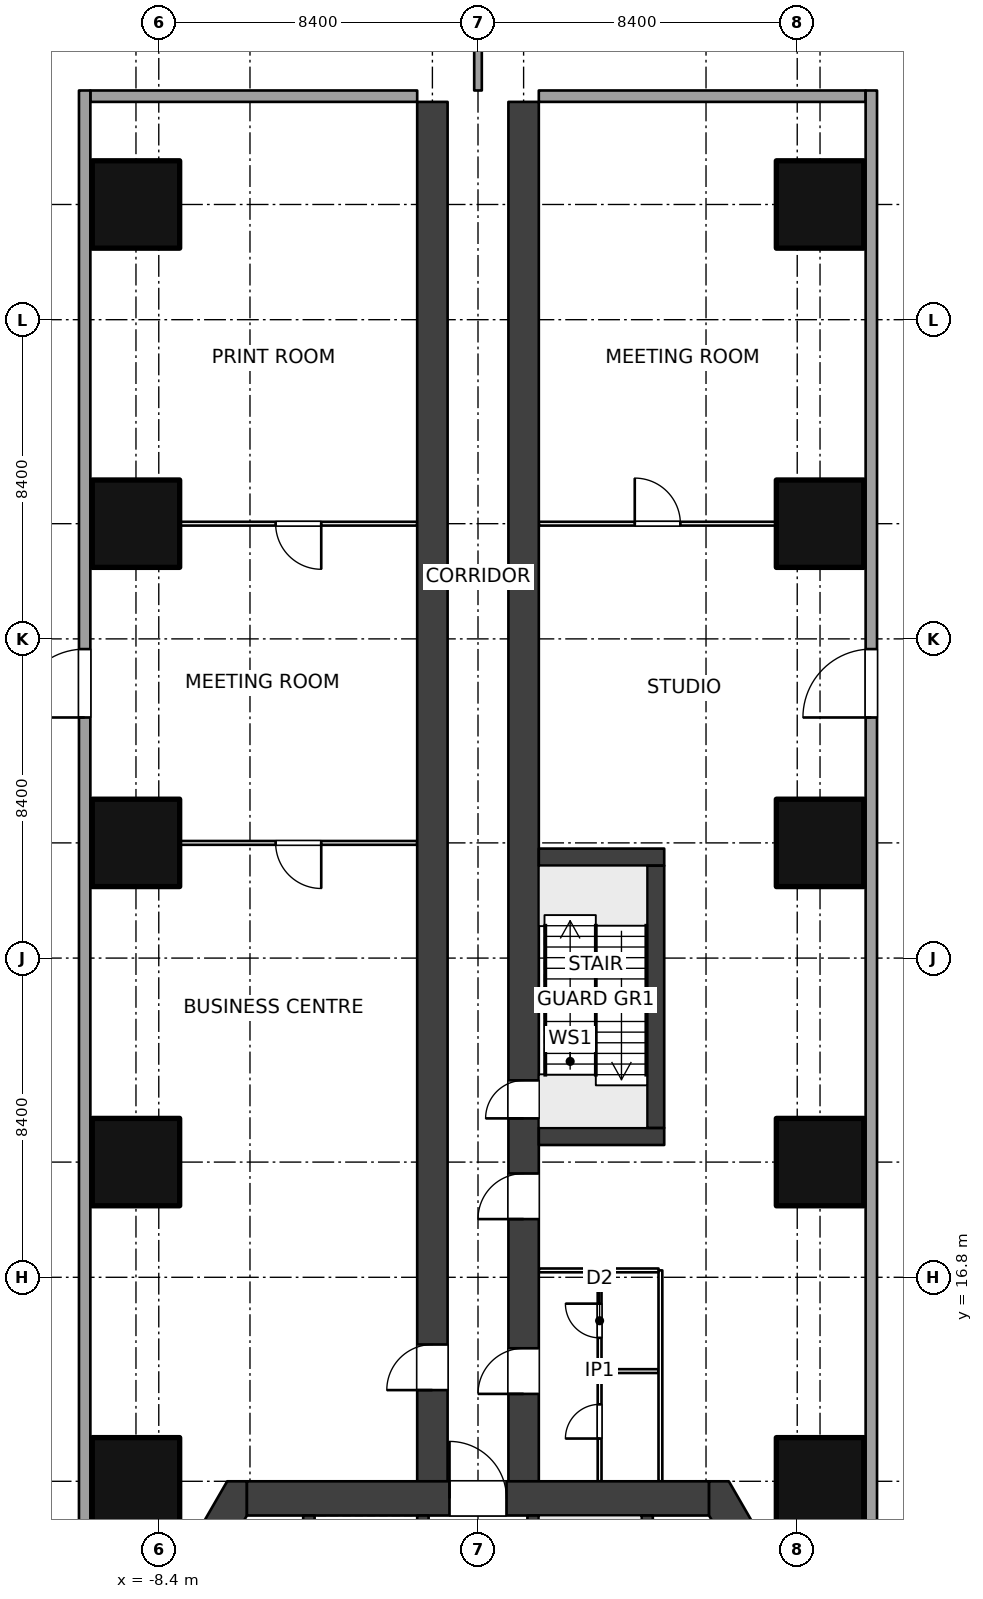
"""IFC4 building model, lengths in metres.
Left out: names, types, materials, properties, quantities, classifications, styles, units other than length and angle.
Written with IfcOpenShell. Run it as: python <this file> out.ifc"""

import sys

from ifc_helpers import new_model, si_unit, direction, frame, frame_2d, origin, origin_2d, place, context, subcontext, project, spatial, polyline, rectangle, outline, extrude, element, fill, save


model = new_model("IFC4")
c1 = context("Model", 3, precision=1e-05, world=origin(), true_north=direction((0.0, 1.0)))
c2 = subcontext(c1, "Body", "Model", "MODEL_VIEW")
j1 = project(units=[si_unit("LENGTHUNIT", "METRE"), si_unit("PLANEANGLEUNIT", "RADIAN")], contexts=[c1])
p1 = place(None, origin())
s1 = spatial("IfcSite", under=j1, at=p1, CompositionType="ELEMENT")
p2 = place(p1, origin())
s2 = spatial("IfcBuilding", under=s1, at=p2, CompositionType="ELEMENT")
p3 = place(p2, frame((0.0, 0.0, 6.0)))
s3 = spatial("IfcBuildingStorey", under=s2, at=p3, CompositionType="ELEMENT", Elevation=6.0)
for number, where, z_axis, x_axis in (
    (1, (-9.0, 11.432, 0.0), (0.0, 0.0, 1.0), (1.0, 0.0, 0.0)),
    (2, (9.0, 11.432, 0.0), (0.0, 0.0, 1.0), (1.0, 0.0, 0.0)),
    (3, (-9.0, 19.832, 0.0), (0.0, 0.0, 1.0), (1.0, 0.0, 0.0)),
    (4, (9.0, 19.832, 0.0), (0.0, 0.0, 1.0), (1.0, 0.0, 0.0)),
    (5, (-9.0, 28.231, 0.0), (0.0, 0.0, 1.0), (1.0, 0.0, 0.0)),
    (6, (9.0, 28.231, 0.0), (0.0, 0.0, 1.0), (1.0, 0.0, 0.0)),
    (7, (-9.0, 36.632, 0.0), (0.0, 0.0, 1.0), (1.0, 0.0, 0.0)),
    (8, (9.0, 36.632, 0.0), (0.0, 0.0, 1.0), (1.0, 0.0, 0.0)),
    (9, (-9.0, 45.031, 0.0), (0.0, 0.0, 1.0), (1.0, 0.0, 0.0)),
    (10, (9.0, 45.031, 0.0), (0.0, 0.0, 1.0), (1.0, 0.0, 0.0)),
):
    element("IfcColumn", number, at=place(p3, frame(where, z_axis=z_axis, x_axis=x_axis)), inside=s3, PredefinedType="COLUMN", context=c2, shape_type="SweptSolid", body=[
        extrude(rectangle(XDim=2.3, YDim=2.3, at=origin_2d()), origin(), (0.0, 0.0, 1.0), 5.0),
    ])
p4 = place(p3, frame((-6.08, 10.981, 0.0), z_axis=(0.0, 0.0, 1.0), x_axis=(1.0, 0.0, 0.0)))
e11 = element("IfcWall", 11, at=p4, inside=s3, PredefinedType="SHEAR", context=c2, shape_type="SweptSolid", body=[
    extrude(rectangle(XDim=12.161, YDim=0.9, at=frame_2d((6.08, 0.0))), origin(), (0.0, 0.0, 1.0), 5.0),
])
p5 = place(p4, frame((5.33, 0.0, 0.0)))
e12 = element("IfcOpeningElement", 12, at=p5, cuts=e11, PredefinedType="OPENING", context=c2, shape_type="SweptSolid", body=[
    extrude(rectangle(XDim=1.5, YDim=2.1, at=frame_2d((0.75, 1.05))), frame((0.0, 0.46, 0.0), z_axis=(0.0, -1.0, 0.0), x_axis=(1.0, 0.0, 0.0)), (0.0, 0.0, 1.0), 0.92),
])
p6 = place(p3, origin())
e13 = element("IfcWall", 13, at=p6, inside=s3, PredefinedType="SHEAR", context=c2, shape_type="SweptSolid", body=[
    extrude(outline(polyline([(13.2, 0.0), (6.6, 11.432), (6.08, 11.432), (6.08, 10.531), (12.161, 0.0), (12.94, -0.45), (13.2, 0.0)])), origin(), (0.0, 0.0, 1.0), 5.0),
])
p7 = place(p3, origin())
e14 = element("IfcWall", 14, at=p7, inside=s3, PredefinedType="SHEAR", context=c2, shape_type="SweptSolid", body=[
    extrude(outline(polyline([(-6.6, 11.432), (-13.2, 0.0), (-12.94, -0.45), (-12.161, 0.0), (-6.08, 10.531), (-6.08, 11.432), (-6.6, 11.432)])), origin(), (0.0, 0.0, 1.0), 5.0),
])
p8 = place(p3, frame((1.45, 3.63, 0.0), z_axis=(0.0, 0.0, 1.0), x_axis=(0.0, 1.0, 0.0)))
e15 = element("IfcWall", 15, at=p8, inside=s3, PredefinedType="SHEAR", context=c2, shape_type="SweptSolid", body=[
    extrude(rectangle(XDim=6.902, YDim=0.3, at=frame_2d((3.451, 0.0))), origin(), (0.0, 0.0, 1.0), 5.0),
])
p9 = place(p8, frame((0.25, 0.0, 0.0)))
e16 = element("IfcOpeningElement", 16, at=p9, cuts=e15, PredefinedType="OPENING", context=c2, shape_type="SweptSolid", body=[
    extrude(rectangle(XDim=1.0, YDim=2.1, at=frame_2d((0.5, 1.05))), frame((0.0, 0.16, 0.0), z_axis=(0.0, -1.0, 0.0), x_axis=(1.0, 0.0, 0.0)), (0.0, 0.0, 1.0), 0.32),
])
p10 = place(p3, frame((4.45, 3.63, 0.0), z_axis=(0.0, 0.0, 1.0), x_axis=(0.0, 1.0, 0.0)))
e17 = element("IfcWall", 17, at=p10, inside=s3, PredefinedType="SHEAR", context=c2, shape_type="SweptSolid", body=[
    extrude(rectangle(XDim=6.902, YDim=0.3, at=frame_2d((3.451, 0.0))), origin(), (0.0, 0.0, 1.0), 5.0),
])
p11 = place(p3, frame((-1.45, 3.63, 0.0), z_axis=(0.0, 0.0, 1.0), x_axis=(0.0, 1.0, 0.0)))
e18 = element("IfcWall", 18, at=p11, inside=s3, PredefinedType="SHEAR", context=c2, shape_type="SweptSolid", body=[
    extrude(rectangle(XDim=6.902, YDim=0.3, at=frame_2d((3.451, 0.0))), origin(), (0.0, 0.0, 1.0), 5.0),
])
p12 = place(p11, frame((4.85, 0.0, 0.0)))
e19 = element("IfcOpeningElement", 19, at=p12, cuts=e18, PredefinedType="OPENING", context=c2, shape_type="SweptSolid", body=[
    extrude(rectangle(XDim=1.1, YDim=2.1, at=frame_2d((0.55, 1.05))), frame((0.0, 0.16, 0.0), z_axis=(0.0, -1.0, 0.0), x_axis=(1.0, 0.0, 0.0)), (0.0, 0.0, 1.0), 0.32),
])
p13 = place(p3, frame((-4.45, 3.63, 0.0), z_axis=(0.0, 0.0, 1.0), x_axis=(0.0, 1.0, 0.0)))
e20 = element("IfcWall", 20, at=p13, inside=s3, PredefinedType="SHEAR", context=c2, shape_type="SweptSolid", body=[
    extrude(rectangle(XDim=6.902, YDim=0.3, at=frame_2d((3.451, 0.0))), origin(), (0.0, 0.0, 1.0), 5.0),
])
p14 = place(p3, frame((-1.2, 10.981, 0.0), z_axis=(0.0, 0.0, 1.0), x_axis=(0.0, 1.0, 0.0)))
e21 = element("IfcWall", 21, at=p14, inside=s3, PredefinedType="SHEAR", context=c2, shape_type="SweptSolid", body=[
    extrude(rectangle(XDim=36.75, YDim=0.8, at=frame_2d((18.375, 0.0))), origin(), (0.0, 0.0, 1.0), 5.0),
])
p15 = place(p14, frame((2.85, 0.0, 0.0)))
e22 = element("IfcOpeningElement", 22, at=p15, cuts=e21, PredefinedType="OPENING", context=c2, shape_type="SweptSolid", body=[
    extrude(rectangle(XDim=1.2, YDim=2.1, at=frame_2d((0.6, 1.05))), frame((0.0, 0.41, 0.0), z_axis=(0.0, -1.0, 0.0), x_axis=(1.0, 0.0, 0.0)), (0.0, 0.0, 1.0), 0.82),
])
p16 = place(p3, frame((1.2, 10.981, 0.0), z_axis=(0.0, 0.0, 1.0), x_axis=(0.0, 1.0, 0.0)))
e23 = element("IfcWall", 23, at=p16, inside=s3, PredefinedType="SHEAR", context=c2, shape_type="SweptSolid", body=[
    extrude(rectangle(XDim=36.75, YDim=0.8, at=frame_2d((18.375, 0.0))), origin(), (0.0, 0.0, 1.0), 5.0),
])
p17 = place(p16, frame((10.0, 0.0, 0.0)))
e24 = element("IfcOpeningElement", 24, at=p17, cuts=e23, PredefinedType="OPENING", context=c2, shape_type="SweptSolid", body=[
    extrude(rectangle(XDim=1.0, YDim=2.1, at=frame_2d((0.5, 1.05))), frame((0.0, 0.41, 0.0), z_axis=(0.0, -1.0, 0.0), x_axis=(1.0, 0.0, 0.0)), (0.0, 0.0, 1.0), 0.82),
])
p18 = place(p16, frame((2.75, 0.0, 0.0)))
e25 = element("IfcOpeningElement", 25, at=p18, cuts=e23, PredefinedType="OPENING", context=c2, shape_type="SweptSolid", body=[
    extrude(rectangle(XDim=1.2, YDim=2.1, at=frame_2d((0.6, 1.05))), frame((0.0, 0.41, 0.0), z_axis=(0.0, -1.0, 0.0), x_axis=(1.0, 0.0, 0.0)), (0.0, 0.0, 1.0), 0.82),
])
p19 = place(p16, frame((7.35, 0.0, 0.0)))
e26 = element("IfcOpeningElement", 26, at=p19, cuts=e23, PredefinedType="OPENING", context=c2, shape_type="SweptSolid", body=[
    extrude(rectangle(XDim=1.2, YDim=2.1, at=frame_2d((0.6, 1.05))), frame((0.0, 0.41, 0.0), z_axis=(0.0, -1.0, 0.0), x_axis=(1.0, 0.0, 0.0)), (0.0, 0.0, 1.0), 0.82),
])
p20 = place(p3, frame((-1.6, 28.231, 0.0), z_axis=(0.0, 0.0, 1.0), x_axis=(-1.0, 0.0, 0.0)))
e27 = element("IfcWall", 27, at=p20, inside=s3, PredefinedType="PARTITIONING", context=c2, shape_type="SweptSolid", body=[
    extrude(rectangle(XDim=6.25, YDim=0.1, at=frame_2d((3.125, 0.0))), origin(), (0.0, 0.0, 1.0), 2.9),
])
p21 = place(p20, frame((2.525, 0.0, 0.0)))
e28 = element("IfcOpeningElement", 28, at=p21, cuts=e27, PredefinedType="OPENING", context=c2, shape_type="SweptSolid", body=[
    extrude(rectangle(XDim=1.2, YDim=2.1, at=frame_2d((0.6, 1.05))), frame((0.0, 0.06, 0.0), z_axis=(0.0, -1.0, 0.0), x_axis=(1.0, 0.0, 0.0)), (0.0, 0.0, 1.0), 0.12),
])
p22 = place(p3, frame((-1.6, 36.632, 0.0), z_axis=(0.0, 0.0, 1.0), x_axis=(-1.0, 0.0, 0.0)))
e29 = element("IfcWall", 29, at=p22, inside=s3, PredefinedType="PARTITIONING", context=c2, shape_type="SweptSolid", body=[
    extrude(rectangle(XDim=6.25, YDim=0.1, at=frame_2d((3.125, 0.0))), origin(), (0.0, 0.0, 1.0), 2.9),
])
p23 = place(p22, frame((2.525, 0.0, 0.0)))
e30 = element("IfcOpeningElement", 30, at=p23, cuts=e29, PredefinedType="OPENING", context=c2, shape_type="SweptSolid", body=[
    extrude(rectangle(XDim=1.2, YDim=2.1, at=frame_2d((0.6, 1.05))), frame((0.0, 0.06, 0.0), z_axis=(0.0, -1.0, 0.0), x_axis=(1.0, 0.0, 0.0)), (0.0, 0.0, 1.0), 0.12),
])
p24 = place(p3, frame((3.2, 11.432, 0.0), z_axis=(0.0, 0.0, 1.0), x_axis=(0.0, 1.0, 0.0)))
e31 = element("IfcWall", 31, at=p24, inside=s3, PredefinedType="PARTITIONING", context=c2, shape_type="SweptSolid", body=[
    extrude(rectangle(XDim=5.6, YDim=0.1, at=frame_2d((2.8, 0.0))), origin(), (0.0, 0.0, 1.0), 4.7),
])
p25 = place(p24, frame((1.125, 0.0, 0.0)))
e32 = element("IfcOpeningElement", 32, at=p25, cuts=e31, PredefinedType="OPENING", context=c2, shape_type="SweptSolid", body=[
    extrude(rectangle(XDim=0.9, YDim=2.1, at=frame_2d((0.45, 1.05))), frame((0.0, 0.06, 0.0), z_axis=(0.0, -1.0, 0.0), x_axis=(1.0, 0.0, 0.0)), (0.0, 0.0, 1.0), 0.12),
])
p26 = place(p24, frame((3.775, 0.0, 0.0)))
e33 = element("IfcOpeningElement", 33, at=p26, cuts=e31, PredefinedType="OPENING", context=c2, shape_type="SweptSolid", body=[
    extrude(rectangle(XDim=0.9, YDim=2.1, at=frame_2d((0.45, 1.05))), frame((0.0, 0.06, 0.0), z_axis=(0.0, -1.0, 0.0), x_axis=(1.0, 0.0, 0.0)), (0.0, 0.0, 1.0), 0.12),
])
p27 = place(p3, frame((3.25, 14.332, 0.0), z_axis=(0.0, 0.0, 1.0), x_axis=(1.0, 0.0, 0.0)))
e34 = element("IfcWall", 34, at=p27, inside=s3, PredefinedType="PARTITIONING", context=c2, shape_type="SweptSolid", body=[
    extrude(rectangle(XDim=1.5, YDim=0.1, at=frame_2d((0.75, 0.0))), origin(), (0.0, 0.0, 1.0), 4.7),
])
p28 = place(p3, frame((4.8, 11.432, 0.0), z_axis=(0.0, 0.0, 1.0), x_axis=(0.0, 1.0, 0.0)))
e35 = element("IfcWall", 35, at=p28, inside=s3, PredefinedType="PARTITIONING", context=c2, shape_type="SweptSolid", body=[
    extrude(rectangle(XDim=5.55, YDim=0.1, at=frame_2d((2.775, 0.0))), origin(), (0.0, 0.0, 1.0), 4.7),
])
p29 = place(p3, frame((1.6, 16.981, 0.0), z_axis=(0.0, 0.0, 1.0), x_axis=(1.0, 0.0, 0.0)))
e36 = element("IfcWall", 36, at=p29, inside=s3, PredefinedType="PARTITIONING", context=c2, shape_type="SweptSolid", body=[
    extrude(rectangle(XDim=3.15, YDim=0.1, at=frame_2d((1.575, 0.0))), origin(), (0.0, 0.0, 1.0), 4.7),
])
p30 = place(p3, frame((1.6, 36.632, 0.0), z_axis=(0.0, 0.0, 1.0), x_axis=(1.0, 0.0, 0.0)))
e37 = element("IfcWall", 37, at=p30, inside=s3, PredefinedType="PARTITIONING", context=c2, shape_type="SweptSolid", body=[
    extrude(rectangle(XDim=6.25, YDim=0.1, at=frame_2d((3.125, 0.0))), origin(), (0.0, 0.0, 1.0), 2.9),
])
p31 = place(p30, frame((2.525, 0.0, 0.0)))
e38 = element("IfcOpeningElement", 38, at=p31, cuts=e37, PredefinedType="OPENING", context=c2, shape_type="SweptSolid", body=[
    extrude(rectangle(XDim=1.2, YDim=2.1, at=frame_2d((0.6, 1.05))), frame((0.0, 0.06, 0.0), z_axis=(0.0, -1.0, 0.0), x_axis=(1.0, 0.0, 0.0)), (0.0, 0.0, 1.0), 0.12),
])
p32 = place(p3, frame((0.0, 48.031, 0.0), z_axis=(0.0, 0.0, 1.0), x_axis=(0.0, 1.0, 0.0)))
e39 = element("IfcWall", 39, at=p32, inside=s3, PredefinedType="SOLIDWALL", context=c2, shape_type="SweptSolid", body=[
    extrude(rectangle(XDim=2.176, YDim=0.2, at=frame_2d((1.088, 0.0))), origin(), (0.0, 0.0, 1.0), 4.7),
])
for number, where, z_axis, x_axis in (
    (40, (-1.6, 47.882, 0.0), (0.0, 0.0, 1.0), (-1.0, 0.0, 0.0)),
    (41, (1.6, 47.882, 0.0), (0.0, 0.0, 1.0), (1.0, 0.0, 0.0)),
):
    element("IfcWall", number, at=place(p3, frame(where, z_axis=z_axis, x_axis=x_axis)), inside=s3, PredefinedType="SOLIDWALL", context=c2, shape_type="SweptSolid", body=[
        extrude(rectangle(XDim=8.6, YDim=0.3, at=frame_2d((4.3, 0.0))), origin(), (0.0, 0.0, 1.0), 3.1),
    ])
p33 = place(p3, frame((-10.35, 6.149, 0.0), z_axis=(0.0, 0.0, 1.0), x_axis=(0.0, 1.0, 0.0)))
e42 = element("IfcWall", 42, at=p33, inside=s3, PredefinedType="SOLIDWALL", context=c2, shape_type="SweptSolid", body=[
    extrude(rectangle(XDim=41.883, YDim=0.3, at=frame_2d((20.941, 0.0))), origin(), (0.0, 0.0, 1.0), 4.7),
])
p34 = place(p33, frame((25.383, 0.0, 0.0)))
e43 = element("IfcOpeningElement", 43, at=p34, cuts=e42, PredefinedType="OPENING", context=c2, shape_type="SweptSolid", body=[
    extrude(rectangle(XDim=1.8, YDim=2.4, at=frame_2d((0.9, 1.2))), frame((0.0, 0.16, 0.0), z_axis=(0.0, -1.0, 0.0), x_axis=(1.0, 0.0, 0.0)), (0.0, 0.0, 1.0), 0.32),
])
p35 = place(p3, frame((10.35, 6.149, 0.0), z_axis=(0.0, 0.0, 1.0), x_axis=(0.0, 1.0, 0.0)))
e44 = element("IfcWall", 44, at=p35, inside=s3, PredefinedType="SOLIDWALL", context=c2, shape_type="SweptSolid", body=[
    extrude(rectangle(XDim=41.883, YDim=0.3, at=frame_2d((20.941, 0.0))), origin(), (0.0, 0.0, 1.0), 4.7),
])
p36 = place(p35, frame((25.383, 0.0, 0.0)))
e45 = element("IfcOpeningElement", 45, at=p36, cuts=e44, PredefinedType="OPENING", context=c2, shape_type="SweptSolid", body=[
    extrude(rectangle(XDim=1.8, YDim=2.4, at=frame_2d((0.9, 1.2))), frame((0.0, 0.16, 0.0), z_axis=(0.0, -1.0, 0.0), x_axis=(1.0, 0.0, 0.0)), (0.0, 0.0, 1.0), 0.32),
])
for number, where, z_axis, x_axis in (
    (46, (1.6, 20.507, 0.0), (0.0, 0.0, 1.0), (1.0, 0.0, 0.0)),
    (47, (1.6, 27.856, 0.0), (0.0, 0.0, 1.0), (1.0, 0.0, 0.0)),
):
    element("IfcWall", number, at=place(p3, frame(where, z_axis=z_axis, x_axis=x_axis)), inside=s3, PredefinedType="SOLIDWALL", context=c2, shape_type="SweptSolid", body=[
        extrude(rectangle(XDim=3.3, YDim=0.45, at=frame_2d((1.65, 0.0))), origin(), (0.0, 0.0, 1.0), 5.0),
    ])
p37 = place(p3, frame((4.675, 20.731, 0.0), z_axis=(0.0, 0.0, 1.0), x_axis=(0.0, 1.0, 0.0)))
e48 = element("IfcWall", 48, at=p37, inside=s3, PredefinedType="SOLIDWALL", context=c2, shape_type="SweptSolid", body=[
    extrude(rectangle(XDim=6.9, YDim=0.45, at=frame_2d((3.45, 0.0))), origin(), (0.0, 0.0, 1.0), 5.0),
])
p38 = place(p5, origin())
e49 = element("IfcDoor", 49, at=p38, inside=s3, OperationType="DOUBLE_DOOR_DOUBLE_SWING", PredefinedType="DOOR", context=c2, shape_type="SweptSolid", body=[
    extrude(rectangle(XDim=1.5, YDim=2.1, at=frame_2d((0.75, 1.05))), frame((0.0, 0.025, 0.0), z_axis=(0.0, -1.0, 0.0), x_axis=(1.0, 0.0, 0.0)), (0.0, 0.0, 1.0), 0.05),
])
fill(e12, e49)
p39 = place(p17, origin())
e50 = element("IfcDoor", 50, at=p39, inside=s3, OperationType="SINGLE_SWING_LEFT", PredefinedType="DOOR", context=c2, shape_type="SweptSolid", body=[
    extrude(rectangle(XDim=1.0, YDim=2.1, at=frame_2d((0.5, 1.05))), frame((0.0, 0.025, 0.0), z_axis=(0.0, -1.0, 0.0), x_axis=(1.0, 0.0, 0.0)), (0.0, 0.0, 1.0), 0.05),
])
fill(e24, e50)
p40 = place(p21, origin())
e51 = element("IfcDoor", 51, at=p40, inside=s3, OperationType="DOUBLE_SWING_LEFT", PredefinedType="DOOR", context=c2, shape_type="SweptSolid", body=[
    extrude(rectangle(XDim=1.2, YDim=2.1, at=frame_2d((0.6, 1.05))), frame((0.0, 0.025, 0.0), z_axis=(0.0, -1.0, 0.0), x_axis=(1.0, 0.0, 0.0)), (0.0, 0.0, 1.0), 0.05),
])
fill(e28, e51)
p41 = place(p23, origin())
e52 = element("IfcDoor", 52, at=p41, inside=s3, OperationType="DOUBLE_SWING_LEFT", PredefinedType="DOOR", context=c2, shape_type="SweptSolid", body=[
    extrude(rectangle(XDim=1.2, YDim=2.1, at=frame_2d((0.6, 1.05))), frame((0.0, 0.025, 0.0), z_axis=(0.0, -1.0, 0.0), x_axis=(1.0, 0.0, 0.0)), (0.0, 0.0, 1.0), 0.05),
])
fill(e30, e52)
p42 = place(p15, origin())
e53 = element("IfcDoor", 53, at=p42, inside=s3, OperationType="DOUBLE_SWING_LEFT", PredefinedType="DOOR", context=c2, shape_type="SweptSolid", body=[
    extrude(rectangle(XDim=1.2, YDim=2.1, at=frame_2d((0.6, 1.05))), frame((0.0, 0.025, 0.0), z_axis=(0.0, -1.0, 0.0), x_axis=(1.0, 0.0, 0.0)), (0.0, 0.0, 1.0), 0.05),
])
fill(e22, e53)
p43 = place(p25, origin())
e54 = element("IfcDoor", 54, at=p43, inside=s3, OperationType="SINGLE_SWING_LEFT", PredefinedType="DOOR", context=c2, shape_type="SweptSolid", body=[
    extrude(rectangle(XDim=0.9, YDim=2.1, at=frame_2d((0.45, 1.05))), frame((0.0, 0.025, 0.0), z_axis=(0.0, -1.0, 0.0), x_axis=(1.0, 0.0, 0.0)), (0.0, 0.0, 1.0), 0.05),
])
fill(e32, e54)
p44 = place(p26, origin())
e55 = element("IfcDoor", 55, at=p44, inside=s3, OperationType="SINGLE_SWING_RIGHT", PredefinedType="DOOR", context=c2, shape_type="SweptSolid", body=[
    extrude(rectangle(XDim=0.9, YDim=2.1, at=frame_2d((0.45, 1.05))), frame((0.0, 0.025, 0.0), z_axis=(0.0, -1.0, 0.0), x_axis=(1.0, 0.0, 0.0)), (0.0, 0.0, 1.0), 0.05),
])
fill(e33, e55)
p45 = place(p18, origin())
e56 = element("IfcDoor", 56, at=p45, inside=s3, OperationType="DOUBLE_SWING_LEFT", PredefinedType="DOOR", context=c2, shape_type="SweptSolid", body=[
    extrude(rectangle(XDim=1.2, YDim=2.1, at=frame_2d((0.6, 1.05))), frame((0.0, 0.025, 0.0), z_axis=(0.0, -1.0, 0.0), x_axis=(1.0, 0.0, 0.0)), (0.0, 0.0, 1.0), 0.05),
])
fill(e25, e56)
p46 = place(p31, origin())
e57 = element("IfcDoor", 57, at=p46, inside=s3, OperationType="DOUBLE_SWING_LEFT", PredefinedType="DOOR", context=c2, shape_type="SweptSolid", body=[
    extrude(rectangle(XDim=1.2, YDim=2.1, at=frame_2d((0.6, 1.05))), frame((0.0, 0.025, 0.0), z_axis=(0.0, -1.0, 0.0), x_axis=(1.0, 0.0, 0.0)), (0.0, 0.0, 1.0), 0.05),
])
fill(e38, e57)
p47 = place(p19, origin())
e58 = element("IfcDoor", 58, at=p47, inside=s3, OperationType="DOUBLE_SWING_LEFT", PredefinedType="DOOR", context=c2, shape_type="SweptSolid", body=[
    extrude(rectangle(XDim=1.2, YDim=2.1, at=frame_2d((0.6, 1.05))), frame((0.0, 0.025, 0.0), z_axis=(0.0, -1.0, 0.0), x_axis=(1.0, 0.0, 0.0)), (0.0, 0.0, 1.0), 0.05),
])
fill(e26, e58)
p48 = place(p34, origin())
e59 = element("IfcDoor", 59, at=p48, inside=s3, OperationType="DOUBLE_DOOR_DOUBLE_SWING", PredefinedType="DOOR", context=c2, shape_type="SweptSolid", body=[
    extrude(rectangle(XDim=1.8, YDim=2.4, at=frame_2d((0.9, 1.2))), frame((0.0, 0.025, 0.0), z_axis=(0.0, -1.0, 0.0), x_axis=(1.0, 0.0, 0.0)), (0.0, 0.0, 1.0), 0.05),
])
fill(e43, e59)
p49 = place(p36, origin())
e60 = element("IfcDoor", 60, at=p49, inside=s3, OperationType="DOUBLE_DOOR_DOUBLE_SWING", PredefinedType="DOOR", context=c2, shape_type="SweptSolid", body=[
    extrude(rectangle(XDim=1.8, YDim=2.4, at=frame_2d((0.9, 1.2))), frame((0.0, 0.025, 0.0), z_axis=(0.0, -1.0, 0.0), x_axis=(1.0, 0.0, 0.0)), (0.0, 0.0, 1.0), 0.05),
])
fill(e45, e60)
save(model, sys.argv[1])
